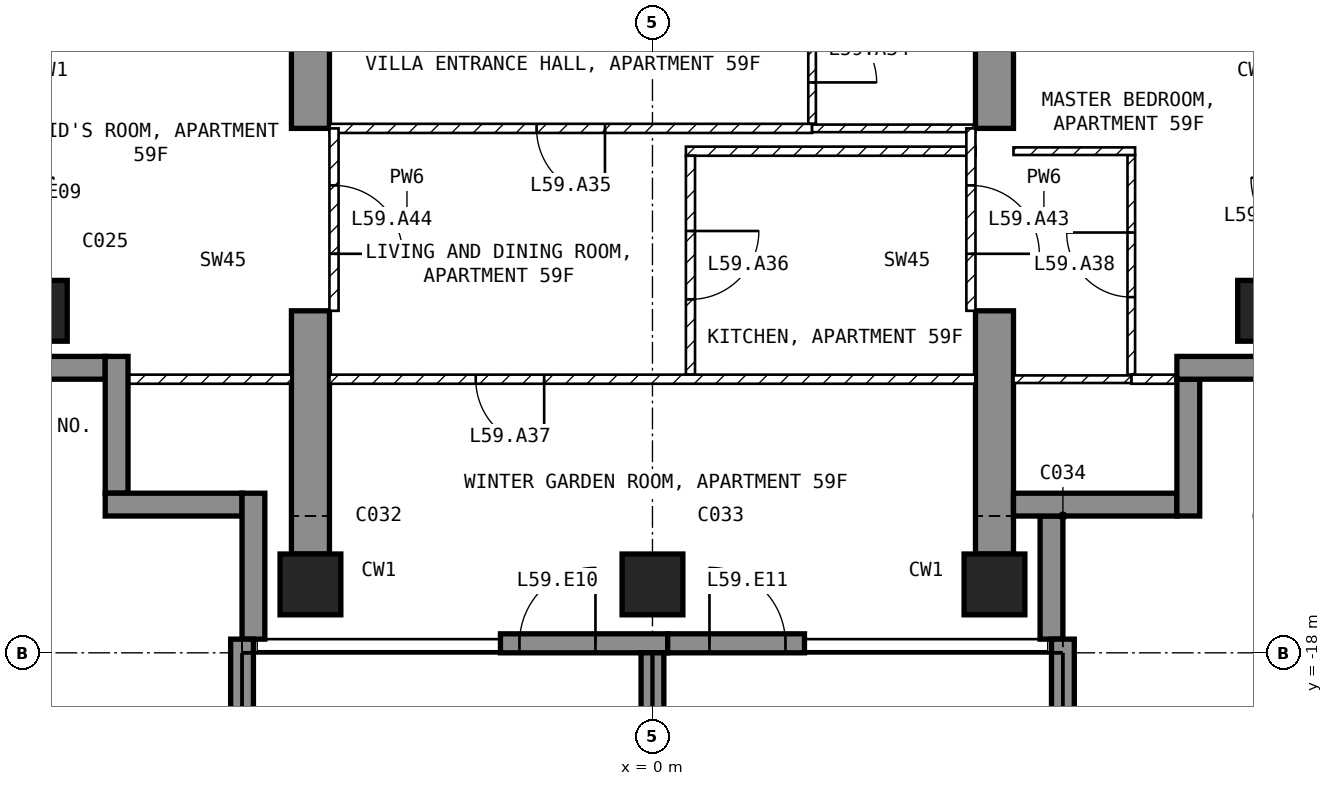
"""IFC4 building model, lengths in metres.
Left out: names, types, materials, properties, quantities, classifications, styles, units other than length and angle.
Written with IfcOpenShell. Run it as: python <this file> out.ifc"""

import sys

from ifc_helpers import new_model, si_unit, direction, frame, frame_2d, origin, origin_2d, place, context, subcontext, project, spatial, polyline, rectangle, outline, extrude, element, fill, save


model = new_model("IFC4")
c1 = context("Model", 3, precision=1e-05, world=origin(), true_north=direction((0.0, 1.0)))
c2 = subcontext(c1, "Body", "Model", "MODEL_VIEW")
j1 = project(units=[si_unit("LENGTHUNIT", "METRE"), si_unit("PLANEANGLEUNIT", "RADIAN")], contexts=[c1])
p1 = place(None, origin())
s1 = spatial("IfcSite", under=j1, at=p1, CompositionType="ELEMENT")
p2 = place(p1, origin())
s2 = spatial("IfcBuilding", under=s1, at=p2, CompositionType="ELEMENT")
p3 = place(p2, frame((0.0, 0.0, 236.0)))
s3 = spatial("IfcBuildingStorey", under=s2, at=p3, CompositionType="ELEMENT", Elevation=236.0)
for number, where, z_axis, x_axis in (
    (1, (-8.1, -13.5, -0.25), (0.0, 0.0, 1.0), (1.0, 0.0, 0.0)),
    (2, (-4.5, -17.1, -0.25), (0.0, 0.0, 1.0), (1.0, 0.0, 0.0)),
    (3, (0.0, -17.1, -0.25), (0.0, 0.0, 1.0), (1.0, 0.0, 0.0)),
    (4, (4.5, -17.1, -0.25), (0.0, 0.0, 1.0), (1.0, 0.0, 0.0)),
    (5, (8.1, -13.5, -0.25), (0.0, 0.0, 1.0), (1.0, 0.0, 0.0)),
):
    element("IfcColumn", number, at=place(p3, frame(where, z_axis=z_axis, x_axis=x_axis)), inside=s3, PredefinedType="COLUMN", context=c2, shape_type="SweptSolid", body=[
        extrude(rectangle(XDim=0.8, YDim=0.8, at=origin_2d()), origin(), (0.0, 0.0, 1.0), 3.5),
    ])
for number, where, z_axis, x_axis in (
    (6, (-4.75, -16.7, -0.25), (1.0, 0.0, 0.0), (0.0, 1.0, 0.0)),
    (7, (4.25, -16.7, -0.25), (1.0, 0.0, 0.0), (0.0, 1.0, 0.0)),
):
    element("IfcWall", number, at=place(p3, frame(where, z_axis=z_axis, x_axis=x_axis)), inside=s3, PredefinedType="SHEAR", context=c2, shape_type="SweptSolid", body=[
        extrude(outline(polyline([(0.0, 0.0), (3.2, 0.0), (3.2, 2.65), (5.6, 2.65), (5.6, 0.0), (7.7, 0.0), (7.7, 3.5), (0.0, 3.5), (0.0, 0.0)])), origin(), (0.0, 0.0, 1.0), 0.5),
    ])
p4 = place(p3, frame((-2.0, -17.875, 0.0), z_axis=(0.0, 0.0, 1.0), x_axis=(1.0, 0.0, 0.0)))
e8 = element("IfcWall", 8, at=p4, inside=s3, PredefinedType="SOLIDWALL", context=c2, shape_type="SweptSolid", body=[
    extrude(rectangle(XDim=2.2, YDim=0.25, at=frame_2d((1.1, 0.0))), origin(), (0.0, 0.0, 1.0), 3.25),
])
p5 = place(p4, frame((0.25, 0.0, 0.0)))
e9 = element("IfcOpeningElement", 9, at=p5, cuts=e8, PredefinedType="OPENING", context=c2, shape_type="SweptSolid", body=[
    extrude(rectangle(XDim=1.0, YDim=2.4, at=frame_2d((0.5, 1.2))), frame((0.0, 0.135, 0.0), z_axis=(0.0, -1.0, 0.0), x_axis=(1.0, 0.0, 0.0)), (0.0, 0.0, 1.0), 0.27),
])
p6 = place(p3, frame((0.2, -17.875, 0.0), z_axis=(0.0, 0.0, 1.0), x_axis=(1.0, 0.0, 0.0)))
e10 = element("IfcWall", 10, at=p6, inside=s3, PredefinedType="SOLIDWALL", context=c2, shape_type="SweptSolid", body=[
    extrude(rectangle(XDim=1.8, YDim=0.25, at=frame_2d((0.9, 0.0))), origin(), (0.0, 0.0, 1.0), 3.25),
])
p7 = place(p6, frame((0.55, 0.0, 0.0)))
e11 = element("IfcOpeningElement", 11, at=p7, cuts=e10, PredefinedType="OPENING", context=c2, shape_type="SweptSolid", body=[
    extrude(rectangle(XDim=1.0, YDim=2.4, at=frame_2d((0.5, 1.2))), frame((0.0, 0.135, 0.0), z_axis=(0.0, -1.0, 0.0), x_axis=(1.0, 0.0, 0.0)), (0.0, 0.0, 1.0), 0.27),
])
p8 = place(p3, frame((5.25, -17.82, 0.0), z_axis=(0.0, 0.0, 1.0), x_axis=(0.0, 1.0, 0.0)))
e12 = element("IfcWall", 12, at=p8, inside=s3, PredefinedType="SOLIDWALL", context=c2, shape_type="SweptSolid", body=[
    extrude(rectangle(XDim=1.62, YDim=0.3, at=frame_2d((0.81, 0.0))), origin(), (0.0, 0.0, 1.0), 3.25),
])
p9 = place(p3, frame((4.75, -16.05, 0.0), z_axis=(0.0, 0.0, 1.0), x_axis=(1.0, 0.0, 0.0)))
e13 = element("IfcWall", 13, at=p9, inside=s3, PredefinedType="SOLIDWALL", context=c2, shape_type="SweptSolid", body=[
    extrude(rectangle(XDim=2.15, YDim=0.3, at=frame_2d((1.075, 0.0))), origin(), (0.0, 0.0, 1.0), 3.25),
])
p10 = place(p3, frame((7.05, -16.2, 0.0), z_axis=(0.0, 0.0, 1.0), x_axis=(0.0, 1.0, 0.0)))
e14 = element("IfcWall", 14, at=p10, inside=s3, PredefinedType="SOLIDWALL", context=c2, shape_type="SweptSolid", body=[
    extrude(rectangle(XDim=1.8, YDim=0.3, at=frame_2d((0.9, 0.0))), origin(), (0.0, 0.0, 1.0), 3.25),
])
p11 = place(p3, frame((6.9, -14.25, 0.0), z_axis=(0.0, 0.0, 1.0), x_axis=(1.0, 0.0, 0.0)))
e15 = element("IfcWall", 15, at=p11, inside=s3, PredefinedType="SOLIDWALL", context=c2, shape_type="SweptSolid", body=[
    extrude(rectangle(XDim=1.85, YDim=0.3, at=frame_2d((0.925, 0.0))), origin(), (0.0, 0.0, 1.0), 3.25),
])
p12 = place(p3, frame((-8.75, -14.25, 0.0), z_axis=(0.0, 0.0, 1.0), x_axis=(1.0, 0.0, 0.0)))
e16 = element("IfcWall", 16, at=p12, inside=s3, PredefinedType="SOLIDWALL", context=c2, shape_type="SweptSolid", body=[
    extrude(rectangle(XDim=1.55, YDim=0.3, at=frame_2d((0.775, 0.0))), origin(), (0.0, 0.0, 1.0), 3.25),
])
p13 = place(p3, frame((-7.05, -14.1, 0.0), z_axis=(0.0, 0.0, 1.0), x_axis=(0.0, -1.0, 0.0)))
e17 = element("IfcWall", 17, at=p13, inside=s3, PredefinedType="SOLIDWALL", context=c2, shape_type="SweptSolid", body=[
    extrude(rectangle(XDim=1.8, YDim=0.3, at=frame_2d((0.9, 0.0))), origin(), (0.0, 0.0, 1.0), 3.25),
])
p14 = place(p3, frame((-7.2, -16.05, 0.0), z_axis=(0.0, 0.0, 1.0), x_axis=(1.0, 0.0, 0.0)))
e18 = element("IfcWall", 18, at=p14, inside=s3, PredefinedType="SOLIDWALL", context=c2, shape_type="SweptSolid", body=[
    extrude(rectangle(XDim=1.8, YDim=0.3, at=frame_2d((0.9, 0.0))), origin(), (0.0, 0.0, 1.0), 3.25),
])
p15 = place(p3, frame((-5.25, -15.9, 0.0), z_axis=(0.0, 0.0, 1.0), x_axis=(0.0, -1.0, 0.0)))
e19 = element("IfcWall", 19, at=p15, inside=s3, PredefinedType="SOLIDWALL", context=c2, shape_type="SweptSolid", body=[
    extrude(rectangle(XDim=1.92, YDim=0.3, at=frame_2d((0.96, 0.0))), origin(), (0.0, 0.0, 1.0), 3.25),
])
p16 = place(p3, frame((-5.4, -17.82, 0.0), z_axis=(0.0, 0.0, 1.0), x_axis=(0.0, -1.0, 0.0)))
e20 = element("IfcWall", 20, at=p16, inside=s3, PredefinedType="SOLIDWALL", context=c2, shape_type="SweptSolid", body=[
    extrude(rectangle(XDim=2.88, YDim=0.3, at=frame_2d((1.44, 0.0))), origin(), (0.0, 0.0, 1.0), 3.25),
])
p17 = place(p3, frame((0.0, -18.0, 0.0), z_axis=(0.0, 0.0, 1.0), x_axis=(0.0, -1.0, 0.0)))
e21 = element("IfcWall", 21, at=p17, inside=s3, PredefinedType="SOLIDWALL", context=c2, shape_type="SweptSolid", body=[
    extrude(rectangle(XDim=2.7, YDim=0.3, at=frame_2d((1.35, 0.0))), origin(), (0.0, 0.0, 1.0), 3.25),
])
p18 = place(p3, frame((5.4, -17.82, 0.0), z_axis=(0.0, 0.0, 1.0), x_axis=(0.0, -1.0, 0.0)))
e22 = element("IfcWall", 22, at=p18, inside=s3, PredefinedType="SOLIDWALL", context=c2, shape_type="SweptSolid", body=[
    extrude(rectangle(XDim=2.88, YDim=0.3, at=frame_2d((1.44, 0.0))), origin(), (0.0, 0.0, 1.0), 3.25),
])
p19 = place(p3, frame((2.1, -9.1, 0.0), z_axis=(0.0, 0.0, 1.0), x_axis=(0.0, -1.0, 0.0)))
e23 = element("IfcWall", 23, at=p19, inside=s3, PredefinedType="PARTITIONING", context=c2, shape_type="SweptSolid", body=[
    extrude(rectangle(XDim=1.94, YDim=0.1, at=frame_2d((0.97, 0.0))), origin(), (0.0, 0.0, 1.0), 3.25),
])
p20 = place(p19, frame((0.545, 0.0, 0.0)))
e24 = element("IfcOpeningElement", 24, at=p20, cuts=e23, PredefinedType="OPENING", context=c2, shape_type="SweptSolid", body=[
    extrude(rectangle(XDim=0.85, YDim=2.1, at=frame_2d((0.425, 1.05))), frame((0.0, 0.06, 0.0), z_axis=(0.0, -1.0, 0.0), x_axis=(1.0, 0.0, 0.0)), (0.0, 0.0, 1.0), 0.12),
])
p21 = place(p3, frame((2.1, -11.1, 0.0), z_axis=(0.0, 0.0, 1.0), x_axis=(-1.0, 0.0, 0.0)))
e25 = element("IfcWall", 25, at=p21, inside=s3, PredefinedType="PARTITIONING", context=c2, shape_type="SweptSolid", body=[
    extrude(rectangle(XDim=6.35, YDim=0.12, at=frame_2d((3.175, 0.0))), origin(), (0.0, 0.0, 1.0), 3.25),
])
p22 = place(p21, frame((2.725, 0.0, 0.0)))
e26 = element("IfcOpeningElement", 26, at=p22, cuts=e25, PredefinedType="OPENING", context=c2, shape_type="SweptSolid", body=[
    extrude(rectangle(XDim=0.9, YDim=2.1, at=frame_2d((0.45, 1.05))), frame((0.0, 0.07, 0.0), z_axis=(0.0, -1.0, 0.0), x_axis=(1.0, 0.0, 0.0)), (0.0, 0.0, 1.0), 0.14),
])
p23 = place(p3, frame((4.25, -11.1, 0.0), z_axis=(0.0, 0.0, 1.0), x_axis=(-1.0, 0.0, 0.0)))
e27 = element("IfcWall", 27, at=p23, inside=s3, PredefinedType="PARTITIONING", context=c2, shape_type="SweptSolid", body=[
    extrude(rectangle(XDim=2.15, YDim=0.1, at=frame_2d((1.075, 0.0))), origin(), (0.0, 0.0, 1.0), 3.25),
])
p24 = place(p3, frame((4.25, -11.4, 0.0), z_axis=(0.0, 0.0, 1.0), x_axis=(-1.0, 0.0, 0.0)))
e28 = element("IfcWall", 28, at=p24, inside=s3, PredefinedType="PARTITIONING", context=c2, shape_type="SweptSolid", body=[
    extrude(rectangle(XDim=3.81, YDim=0.12, at=frame_2d((1.905, 0.0))), origin(), (0.0, 0.0, 1.0), 3.25),
])
p25 = place(p3, frame((0.5, -11.46, 0.0), z_axis=(0.0, 0.0, 1.0), x_axis=(0.0, -1.0, 0.0)))
e29 = element("IfcWall", 29, at=p25, inside=s3, PredefinedType="PARTITIONING", context=c2, shape_type="SweptSolid", body=[
    extrude(rectangle(XDim=2.88, YDim=0.12, at=frame_2d((1.44, 0.0))), origin(), (0.0, 0.0, 1.0), 3.25),
])
p26 = place(p25, frame((0.99, 0.0, 0.0)))
e30 = element("IfcOpeningElement", 30, at=p26, cuts=e29, PredefinedType="OPENING", context=c2, shape_type="SweptSolid", body=[
    extrude(rectangle(XDim=0.9, YDim=2.1, at=frame_2d((0.45, 1.05))), frame((0.0, 0.07, 0.0), z_axis=(0.0, -1.0, 0.0), x_axis=(1.0, 0.0, 0.0)), (0.0, 0.0, 1.0), 0.14),
])
p27 = place(p3, frame((4.25, -14.4, 0.0), z_axis=(0.0, 0.0, 1.0), x_axis=(-1.0, 0.0, 0.0)))
e31 = element("IfcWall", 31, at=p27, inside=s3, PredefinedType="PARTITIONING", context=c2, shape_type="SweptSolid", body=[
    extrude(rectangle(XDim=8.5, YDim=0.12, at=frame_2d((4.25, 0.0))), origin(), (0.0, 0.0, 1.0), 3.25),
])
p28 = place(p27, frame((5.675, 0.0, 0.0)))
e32 = element("IfcOpeningElement", 32, at=p28, cuts=e31, PredefinedType="OPENING", context=c2, shape_type="SweptSolid", body=[
    extrude(rectangle(XDim=0.9, YDim=2.1, at=frame_2d((0.45, 1.05))), frame((0.0, 0.07, 0.0), z_axis=(0.0, -1.0, 0.0), x_axis=(1.0, 0.0, 0.0)), (0.0, 0.0, 1.0), 0.14),
])
p29 = place(p3, frame((6.3, -14.34, 0.0), z_axis=(0.0, 0.0, 1.0), x_axis=(0.0, 1.0, 0.0)))
e33 = element("IfcWall", 33, at=p29, inside=s3, PredefinedType="PARTITIONING", context=c2, shape_type="SweptSolid", body=[
    extrude(rectangle(XDim=2.89, YDim=0.1, at=frame_2d((1.445, 0.0))), origin(), (0.0, 0.0, 1.0), 3.25),
])
p30 = place(p29, frame((1.02, 0.0, 0.0)))
e34 = element("IfcOpeningElement", 34, at=p30, cuts=e33, PredefinedType="OPENING", context=c2, shape_type="SweptSolid", body=[
    extrude(rectangle(XDim=0.85, YDim=2.1, at=frame_2d((0.425, 1.05))), frame((0.0, 0.06, 0.0), z_axis=(0.0, -1.0, 0.0), x_axis=(1.0, 0.0, 0.0)), (0.0, 0.0, 1.0), 0.12),
])
p31 = place(p3, frame((6.35, -11.4, 0.0), z_axis=(0.0, 0.0, 1.0), x_axis=(-1.0, 0.0, 0.0)))
e35 = element("IfcWall", 35, at=p31, inside=s3, PredefinedType="PARTITIONING", context=c2, shape_type="SweptSolid", body=[
    extrude(rectangle(XDim=1.6, YDim=0.1, at=frame_2d((0.8, 0.0))), origin(), (0.0, 0.0, 1.0), 3.25),
])
p32 = place(p3, frame((7.12, -14.4, 0.0), z_axis=(0.0, 0.0, 1.0), x_axis=(-1.0, 0.0, 0.0)))
e36 = element("IfcWall", 36, at=p32, inside=s3, PredefinedType="PARTITIONING", context=c2, shape_type="SweptSolid", body=[
    extrude(rectangle(XDim=0.82, YDim=0.12, at=frame_2d((0.41, 0.0))), origin(), (0.0, 0.0, 1.0), 3.25),
])
p33 = place(p3, frame((6.3, -14.4, 0.0), z_axis=(0.0, 0.0, 1.0), x_axis=(-1.0, 0.0, 0.0)))
e37 = element("IfcWall", 37, at=p33, inside=s3, PredefinedType="PARTITIONING", context=c2, shape_type="SweptSolid", body=[
    extrude(rectangle(XDim=1.55, YDim=0.1, at=frame_2d((0.775, 0.0))), origin(), (0.0, 0.0, 1.0), 3.25),
])
p34 = place(p3, frame((-4.75, -14.4, 0.0), z_axis=(0.0, 0.0, 1.0), x_axis=(-1.0, 0.0, 0.0)))
e38 = element("IfcWall", 38, at=p34, inside=s3, PredefinedType="PARTITIONING", context=c2, shape_type="SweptSolid", body=[
    extrude(rectangle(XDim=2.37, YDim=0.12, at=frame_2d((1.185, 0.0))), origin(), (0.0, 0.0, 1.0), 3.25),
])
p35 = place(p3, frame((4.19, -11.1, 0.0), z_axis=(0.0, 0.0, 1.0), x_axis=(0.0, -1.0, 0.0)))
e39 = element("IfcWall", 39, at=p35, inside=s3, PredefinedType="PARTITIONING", context=c2, shape_type="SweptSolid", body=[
    extrude(rectangle(XDim=2.4, YDim=0.12, at=frame_2d((1.2, 0.0))), origin(), (0.0, 0.0, 1.0), 2.4),
])
p36 = place(p35, frame((0.75, 0.0, 0.0)))
e40 = element("IfcOpeningElement", 40, at=p36, cuts=e39, PredefinedType="OPENING", context=c2, shape_type="SweptSolid", body=[
    extrude(rectangle(XDim=0.9, YDim=2.1, at=frame_2d((0.45, 1.05))), frame((0.0, 0.07, 0.0), z_axis=(0.0, -1.0, 0.0), x_axis=(1.0, 0.0, 0.0)), (0.0, 0.0, 1.0), 0.14),
])
p37 = place(p3, frame((-4.19, -11.1, 0.0), z_axis=(0.0, 0.0, 1.0), x_axis=(0.0, -1.0, 0.0)))
e41 = element("IfcWall", 41, at=p37, inside=s3, PredefinedType="PARTITIONING", context=c2, shape_type="SweptSolid", body=[
    extrude(rectangle(XDim=2.4, YDim=0.12, at=frame_2d((1.2, 0.0))), origin(), (0.0, 0.0, 1.0), 2.4),
])
p38 = place(p37, frame((0.75, 0.0, 0.0)))
e42 = element("IfcOpeningElement", 42, at=p38, cuts=e41, PredefinedType="OPENING", context=c2, shape_type="SweptSolid", body=[
    extrude(rectangle(XDim=0.9, YDim=2.1, at=frame_2d((0.45, 1.05))), frame((0.0, 0.07, 0.0), z_axis=(0.0, -1.0, 0.0), x_axis=(1.0, 0.0, 0.0)), (0.0, 0.0, 1.0), 0.14),
])
p39 = place(p5, origin())
e43 = element("IfcDoor", 43, at=p39, inside=s3, OperationType="SINGLE_SWING_RIGHT", PredefinedType="DOOR", context=c2, shape_type="SweptSolid", body=[
    extrude(rectangle(XDim=1.0, YDim=2.4, at=frame_2d((0.5, 1.2))), frame((0.0, 0.025, 0.0), z_axis=(0.0, -1.0, 0.0), x_axis=(1.0, 0.0, 0.0)), (0.0, 0.0, 1.0), 0.05),
])
fill(e9, e43)
p40 = place(p7, origin())
e44 = element("IfcDoor", 44, at=p40, inside=s3, OperationType="SINGLE_SWING_LEFT", PredefinedType="DOOR", context=c2, shape_type="SweptSolid", body=[
    extrude(rectangle(XDim=1.0, YDim=2.4, at=frame_2d((0.5, 1.2))), frame((0.0, 0.025, 0.0), z_axis=(0.0, -1.0, 0.0), x_axis=(1.0, 0.0, 0.0)), (0.0, 0.0, 1.0), 0.05),
])
fill(e11, e44)
p41 = place(p20, origin())
e45 = element("IfcDoor", 45, at=p41, inside=s3, OperationType="SINGLE_SWING_RIGHT", PredefinedType="DOOR", context=c2, shape_type="SweptSolid", body=[
    extrude(rectangle(XDim=0.85, YDim=2.1, at=frame_2d((0.425, 1.05))), frame((0.0, 0.025, 0.0), z_axis=(0.0, -1.0, 0.0), x_axis=(1.0, 0.0, 0.0)), (0.0, 0.0, 1.0), 0.05),
])
fill(e24, e45)
p42 = place(p22, origin())
e46 = element("IfcDoor", 46, at=p42, inside=s3, OperationType="SINGLE_SWING_LEFT", PredefinedType="DOOR", context=c2, shape_type="SweptSolid", body=[
    extrude(rectangle(XDim=0.9, YDim=2.1, at=frame_2d((0.45, 1.05))), frame((0.0, 0.025, 0.0), z_axis=(0.0, -1.0, 0.0), x_axis=(1.0, 0.0, 0.0)), (0.0, 0.0, 1.0), 0.05),
])
fill(e26, e46)
p43 = place(p26, origin())
e47 = element("IfcDoor", 47, at=p43, inside=s3, OperationType="SINGLE_SWING_LEFT", PredefinedType="DOOR", context=c2, shape_type="SweptSolid", body=[
    extrude(rectangle(XDim=0.9, YDim=2.1, at=frame_2d((0.45, 1.05))), frame((0.0, 0.025, 0.0), z_axis=(0.0, -1.0, 0.0), x_axis=(1.0, 0.0, 0.0)), (0.0, 0.0, 1.0), 0.05),
])
fill(e30, e47)
p44 = place(p28, origin())
e48 = element("IfcDoor", 48, at=p44, inside=s3, OperationType="SINGLE_SWING_LEFT", PredefinedType="DOOR", context=c2, shape_type="SweptSolid", body=[
    extrude(rectangle(XDim=0.9, YDim=2.1, at=frame_2d((0.45, 1.05))), frame((0.0, 0.025, 0.0), z_axis=(0.0, -1.0, 0.0), x_axis=(1.0, 0.0, 0.0)), (0.0, 0.0, 1.0), 0.05),
])
fill(e32, e48)
p45 = place(p30, origin())
e49 = element("IfcDoor", 49, at=p45, inside=s3, OperationType="SINGLE_SWING_RIGHT", PredefinedType="DOOR", context=c2, shape_type="SweptSolid", body=[
    extrude(rectangle(XDim=0.85, YDim=2.1, at=frame_2d((0.425, 1.05))), frame((0.0, 0.025, 0.0), z_axis=(0.0, -1.0, 0.0), x_axis=(1.0, 0.0, 0.0)), (0.0, 0.0, 1.0), 0.05),
])
fill(e34, e49)
p46 = place(p36, origin())
e50 = element("IfcDoor", 50, at=p46, inside=s3, OperationType="SINGLE_SWING_RIGHT", PredefinedType="DOOR", context=c2, shape_type="SweptSolid", body=[
    extrude(rectangle(XDim=0.9, YDim=2.1, at=frame_2d((0.45, 1.05))), frame((0.0, 0.025, 0.0), z_axis=(0.0, -1.0, 0.0), x_axis=(1.0, 0.0, 0.0)), (0.0, 0.0, 1.0), 0.05),
])
fill(e40, e50)
p47 = place(p38, origin())
e51 = element("IfcDoor", 51, at=p47, inside=s3, OperationType="SINGLE_SWING_RIGHT", PredefinedType="DOOR", context=c2, shape_type="SweptSolid", body=[
    extrude(rectangle(XDim=0.9, YDim=2.1, at=frame_2d((0.45, 1.05))), frame((0.0, 0.025, 0.0), z_axis=(0.0, -1.0, 0.0), x_axis=(1.0, 0.0, 0.0)), (0.0, 0.0, 1.0), 0.05),
])
fill(e42, e51)
save(model, sys.argv[1])
